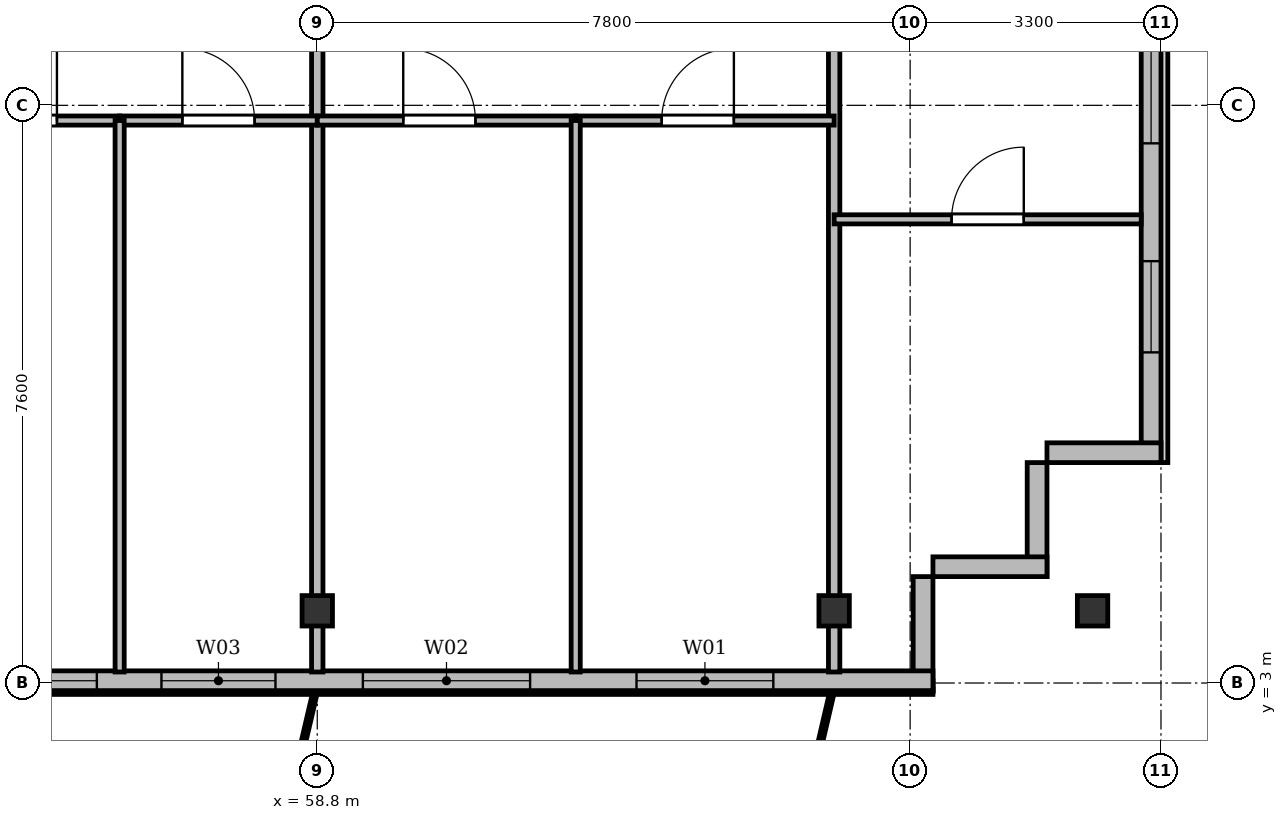
"""IFC4 building model, lengths in metres.
Left out: names, types, materials, properties, quantities, classifications, styles, units other than length and angle.
Written with IfcOpenShell. Run it as: python <this file> out.ifc"""

import sys

from ifc_helpers import new_model, si_unit, direction, frame, frame_2d, origin, origin_2d, place, context, subcontext, project, spatial, rectangle, i_section, extrude, source, transform, mapped, element, fill, save


model = new_model("IFC4")
c1 = context("Model", 3, precision=1e-05, world=origin(), true_north=direction((0.0, 1.0)))
c2 = subcontext(c1, "Body", "Model", "MODEL_VIEW")
j1 = project(units=[si_unit("LENGTHUNIT", "METRE"), si_unit("PLANEANGLEUNIT", "RADIAN")], contexts=[c1])
p1 = place(None, origin())
s1 = spatial("IfcSite", under=j1, at=p1, CompositionType="ELEMENT")
p2 = place(p1, origin())
s2 = spatial("IfcBuilding", under=s1, at=p2, CompositionType="ELEMENT")
p3 = place(p2, frame((0.0, 0.0, 96.1)))
s3 = spatial("IfcBuildingStorey", under=s2, at=p3, CompositionType="ELEMENT", Elevation=96.1)
m1 = source(origin(), c2, "Body", "SweptSolid", [
    extrude(i_section(OverallWidth=0.4, OverallDepth=0.4, WebThickness=0.022, FlangeThickness=0.035, at=origin_2d()), origin(), (0.0, 0.0, 1.0), 3.6),
])
for number, where, z_axis, x_axis in (
    (1, (58.8, 3.95, 0.0), (0.0, 0.0, 1.0), (1.0, 0.0, 0.0)),
    (2, (65.6, 3.95, 0.0), (0.0, 0.0, 1.0), (1.0, 0.0, 0.0)),
    (3, (69.0, 3.95, 0.0), (0.0, 0.0, 1.0), (1.0, 0.0, 0.0)),
):
    element("IfcColumn", number, at=place(p3, frame(where, z_axis=z_axis, x_axis=x_axis)), inside=s3, PredefinedType="COLUMN", context=c2, shape_type="MappedRepresentation", body=[
        mapped(m1, transform((0.0, 0.0, 0.0), x_axis=(1.0, 0.0, 0.0), y_axis=(0.0, 1.0, 0.0), z_axis=(0.0, 0.0, 1.0), scale=1.0)),
    ])
p4 = place(p3, frame((69.77, 45.5, 0.0), z_axis=(0.0, 0.0, 1.0), x_axis=(0.0, -1.0, 0.0)))
e4 = element("IfcWall", 4, at=p4, inside=s3, PredefinedType="SOLIDWALL", context=c2, shape_type="SweptSolid", body=[
    extrude(rectangle(XDim=39.6, YDim=0.26, at=frame_2d((19.8, 0.0))), origin(), (0.0, 0.0, 1.0), 3.34),
])
p5 = place(p4, frame((36.95, 0.0, 0.92)))
e5 = element("IfcOpeningElement", 5, at=p5, cuts=e4, PredefinedType="OPENING", context=c2, shape_type="SweptSolid", body=[
    extrude(rectangle(XDim=1.2, YDim=1.65, at=frame_2d((0.6, 0.825))), frame((0.0, 0.14, 0.0), z_axis=(0.0, -1.0, 0.0), x_axis=(1.0, 0.0, 0.0)), (0.0, 0.0, 1.0), 0.28),
])
p6 = place(p4, frame((32.8, 0.0, 0.92)))
e6 = element("IfcOpeningElement", 6, at=p6, cuts=e4, PredefinedType="OPENING", context=c2, shape_type="SweptSolid", body=[
    extrude(rectangle(XDim=2.6, YDim=1.9, at=frame_2d((1.3, 0.95))), frame((0.0, 0.14, 0.0), z_axis=(0.0, -1.0, 0.0), x_axis=(1.0, 0.0, 0.0)), (0.0, 0.0, 1.0), 0.28),
])
p7 = place(p4, frame((28.6, 0.0, 0.92)))
e7 = element("IfcOpeningElement", 7, at=p7, cuts=e4, PredefinedType="OPENING", context=c2, shape_type="SweptSolid", body=[
    extrude(rectangle(XDim=2.6, YDim=1.9, at=frame_2d((1.3, 0.95))), frame((0.0, 0.14, 0.0), z_axis=(0.0, -1.0, 0.0), x_axis=(1.0, 0.0, 0.0)), (0.0, 0.0, 1.0), 0.28),
])
p8 = place(p4, frame((21.4, 0.0, 0.92)))
e8 = element("IfcOpeningElement", 8, at=p8, cuts=e4, PredefinedType="OPENING", context=c2, shape_type="SweptSolid", body=[
    extrude(rectangle(XDim=2.6, YDim=1.9, at=frame_2d((1.3, 0.95))), frame((0.0, 0.14, 0.0), z_axis=(0.0, -1.0, 0.0), x_axis=(1.0, 0.0, 0.0)), (0.0, 0.0, 1.0), 0.28),
])
p9 = place(p4, frame((7.4, 0.0, 0.92)))
e9 = element("IfcOpeningElement", 9, at=p9, cuts=e4, PredefinedType="OPENING", context=c2, shape_type="SweptSolid", body=[
    extrude(rectangle(XDim=2.6, YDim=1.9, at=frame_2d((1.3, 0.95))), frame((0.0, 0.14, 0.0), z_axis=(0.0, -1.0, 0.0), x_axis=(1.0, 0.0, 0.0)), (0.0, 0.0, 1.0), 0.28),
])
p10 = place(p4, frame((4.5, 0.0, 0.92)))
e10 = element("IfcOpeningElement", 10, at=p10, cuts=e4, PredefinedType="OPENING", context=c2, shape_type="SweptSolid", body=[
    extrude(rectangle(XDim=1.2, YDim=1.65, at=frame_2d((0.6, 0.825))), frame((0.0, 0.14, 0.0), z_axis=(0.0, -1.0, 0.0), x_axis=(1.0, 0.0, 0.0)), (0.0, 0.0, 1.0), 0.28),
])
p11 = place(p4, frame((1.15, 0.0, 0.92)))
e11 = element("IfcOpeningElement", 11, at=p11, cuts=e4, PredefinedType="OPENING", context=c2, shape_type="SweptSolid", body=[
    extrude(rectangle(XDim=1.2, YDim=1.65, at=frame_2d((0.6, 0.825))), frame((0.0, 0.14, 0.0), z_axis=(0.0, -1.0, 0.0), x_axis=(1.0, 0.0, 0.0)), (0.0, 0.0, 1.0), 0.28),
])
p12 = place(p3, frame((69.9, 6.03, 0.0), z_axis=(0.0, 0.0, 1.0), x_axis=(-1.0, 0.0, 0.0)))
e12 = element("IfcWall", 12, at=p12, inside=s3, PredefinedType="SOLIDWALL", context=c2, shape_type="SweptSolid", body=[
    extrude(rectangle(XDim=1.5, YDim=0.26, at=frame_2d((0.75, 0.0))), origin(), (0.0, 0.0, 1.0), 2.84),
])
for number, where, z_axis, x_axis in (
    (13, (68.27, 5.9, 0.0), (0.0, 0.0, 1.0), (0.0, -1.0, 0.0)),
    (14, (68.4, 4.53, 0.0), (0.0, 0.0, 1.0), (-1.0, 0.0, 0.0)),
):
    element("IfcWall", number, at=place(p3, frame(where, z_axis=z_axis, x_axis=x_axis)), inside=s3, PredefinedType="SOLIDWALL", context=c2, shape_type="SweptSolid", body=[
        extrude(rectangle(XDim=1.5, YDim=0.26, at=frame_2d((0.75, 0.0))), origin(), (0.0, 0.0, 1.0), 3.34),
    ])
p13 = place(p3, frame((66.77, 4.4, 0.0), z_axis=(0.0, 0.0, 1.0), x_axis=(0.0, -1.0, 0.0)))
e15 = element("IfcWall", 15, at=p13, inside=s3, PredefinedType="SOLIDWALL", context=c2, shape_type="SweptSolid", body=[
    extrude(rectangle(XDim=1.5, YDim=0.26, at=frame_2d((0.75, 0.0))), origin(), (0.0, 0.0, 1.0), 2.752),
])
p14 = place(p3, frame((66.9, 3.03, 0.0), z_axis=(0.0, 0.0, 1.0), x_axis=(-1.0, 0.0, 0.0)))
e16 = element("IfcWall", 16, at=p14, inside=s3, PredefinedType="SOLIDWALL", context=c2, shape_type="SweptSolid", body=[
    extrude(rectangle(XDim=59.4, YDim=0.26, at=frame_2d((29.7, 0.0))), origin(), (0.0, 0.0, 1.0), 3.34),
])
p15 = place(p14, frame((2.1, 0.0, 0.9)))
e17 = element("IfcOpeningElement", 17, at=p15, cuts=e16, PredefinedType="OPENING", context=c2, shape_type="SweptSolid", body=[
    extrude(rectangle(XDim=1.8, YDim=1.8, at=frame_2d((0.9, 0.9))), frame((0.0, 0.14, 0.0), z_axis=(0.0, -1.0, 0.0), x_axis=(1.0, 0.0, 0.0)), (0.0, 0.0, 1.0), 0.28),
])
p16 = place(p14, frame((5.3, 0.0, 0.9)))
e18 = element("IfcOpeningElement", 18, at=p16, cuts=e16, PredefinedType="OPENING", context=c2, shape_type="SweptSolid", body=[
    extrude(rectangle(XDim=2.2, YDim=1.8, at=frame_2d((1.1, 0.9))), frame((0.0, 0.14, 0.0), z_axis=(0.0, -1.0, 0.0), x_axis=(1.0, 0.0, 0.0)), (0.0, 0.0, 1.0), 0.28),
])
p17 = place(p14, frame((8.65, 0.0, 0.9)))
e19 = element("IfcOpeningElement", 19, at=p17, cuts=e16, PredefinedType="OPENING", context=c2, shape_type="SweptSolid", body=[
    extrude(rectangle(XDim=1.5, YDim=1.75, at=frame_2d((0.75, 0.875))), frame((0.0, 0.14, 0.0), z_axis=(0.0, -1.0, 0.0), x_axis=(1.0, 0.0, 0.0)), (0.0, 0.0, 1.0), 0.28),
])
p18 = place(p14, frame((11.0, 0.0, 0.9)))
e20 = element("IfcOpeningElement", 20, at=p18, cuts=e16, PredefinedType="OPENING", context=c2, shape_type="SweptSolid", body=[
    extrude(rectangle(XDim=2.0, YDim=1.95, at=frame_2d((1.0, 0.975))), frame((0.0, 0.14, 0.0), z_axis=(0.0, -1.0, 0.0), x_axis=(1.0, 0.0, 0.0)), (0.0, 0.0, 1.0), 0.28),
])
p19 = place(p14, frame((13.775, 0.0, 0.9)))
e21 = element("IfcOpeningElement", 21, at=p19, cuts=e16, PredefinedType="OPENING", context=c2, shape_type="SweptSolid", body=[
    extrude(rectangle(XDim=1.65, YDim=1.85, at=frame_2d((0.825, 0.925))), frame((0.0, 0.14, 0.0), z_axis=(0.0, -1.0, 0.0), x_axis=(1.0, 0.0, 0.0)), (0.0, 0.0, 1.0), 0.28),
])
p20 = place(p14, frame((16.7, 0.0, 0.9)))
e22 = element("IfcOpeningElement", 22, at=p20, cuts=e16, PredefinedType="OPENING", context=c2, shape_type="SweptSolid", body=[
    extrude(rectangle(XDim=1.8, YDim=1.8, at=frame_2d((0.9, 0.9))), frame((0.0, 0.14, 0.0), z_axis=(0.0, -1.0, 0.0), x_axis=(1.0, 0.0, 0.0)), (0.0, 0.0, 1.0), 0.28),
])
p21 = place(p14, frame((20.227, 0.0, 0.0)))
e23 = element("IfcOpeningElement", 23, at=p21, cuts=e16, PredefinedType="OPENING", context=c2, shape_type="SweptSolid", body=[
    extrude(rectangle(XDim=1.2, YDim=2.2, at=frame_2d((0.6, 1.1))), frame((0.0, 0.14, 0.0), z_axis=(0.0, -1.0, 0.0), x_axis=(1.0, 0.0, 0.0)), (0.0, 0.0, 1.0), 0.28),
])
p22 = place(p14, frame((28.95, 0.0, 0.9)))
e24 = element("IfcOpeningElement", 24, at=p22, cuts=e16, PredefinedType="OPENING", context=c2, shape_type="SweptSolid", body=[
    extrude(rectangle(XDim=1.5, YDim=1.75, at=frame_2d((0.75, 0.875))), frame((0.0, 0.14, 0.0), z_axis=(0.0, -1.0, 0.0), x_axis=(1.0, 0.0, 0.0)), (0.0, 0.0, 1.0), 0.28),
])
p23 = place(p14, frame((36.5, 0.0, 0.9)))
e25 = element("IfcOpeningElement", 25, at=p23, cuts=e16, PredefinedType="OPENING", context=c2, shape_type="SweptSolid", body=[
    extrude(rectangle(XDim=2.0, YDim=1.95, at=frame_2d((1.0, 0.975))), frame((0.0, 0.14, 0.0), z_axis=(0.0, -1.0, 0.0), x_axis=(1.0, 0.0, 0.0)), (0.0, 0.0, 1.0), 0.28),
])
p24 = place(p14, frame((39.075, 0.0, 0.9)))
e26 = element("IfcOpeningElement", 26, at=p24, cuts=e16, PredefinedType="OPENING", context=c2, shape_type="SweptSolid", body=[
    extrude(rectangle(XDim=1.65, YDim=1.85, at=frame_2d((0.825, 0.925))), frame((0.0, 0.14, 0.0), z_axis=(0.0, -1.0, 0.0), x_axis=(1.0, 0.0, 0.0)), (0.0, 0.0, 1.0), 0.28),
])
p25 = place(p14, frame((41.4, 0.0, 0.9)))
e27 = element("IfcOpeningElement", 27, at=p25, cuts=e16, PredefinedType="OPENING", context=c2, shape_type="SweptSolid", body=[
    extrude(rectangle(XDim=1.8, YDim=1.8, at=frame_2d((0.9, 0.9))), frame((0.0, 0.14, 0.0), z_axis=(0.0, -1.0, 0.0), x_axis=(1.0, 0.0, 0.0)), (0.0, 0.0, 1.0), 0.28),
])
p26 = place(p14, frame((45.36, 0.0, 0.0)))
e28 = element("IfcOpeningElement", 28, at=p26, cuts=e16, PredefinedType="OPENING", context=c2, shape_type="SweptSolid", body=[
    extrude(rectangle(XDim=1.2, YDim=2.2, at=frame_2d((0.6, 1.1))), frame((0.0, 0.14, 0.0), z_axis=(0.0, -1.0, 0.0), x_axis=(1.0, 0.0, 0.0)), (0.0, 0.0, 1.0), 0.28),
])
p27 = place(p14, frame((48.55, 0.0, 0.9)))
e29 = element("IfcOpeningElement", 29, at=p27, cuts=e16, PredefinedType="OPENING", context=c2, shape_type="SweptSolid", body=[
    extrude(rectangle(XDim=1.5, YDim=1.75, at=frame_2d((0.75, 0.875))), frame((0.0, 0.14, 0.0), z_axis=(0.0, -1.0, 0.0), x_axis=(1.0, 0.0, 0.0)), (0.0, 0.0, 1.0), 0.28),
])
p28 = place(p14, frame((52.0, 0.0, 0.9)))
e30 = element("IfcOpeningElement", 30, at=p28, cuts=e16, PredefinedType="OPENING", context=c2, shape_type="SweptSolid", body=[
    extrude(rectangle(XDim=2.0, YDim=1.95, at=frame_2d((1.0, 0.975))), frame((0.0, 0.14, 0.0), z_axis=(0.0, -1.0, 0.0), x_axis=(1.0, 0.0, 0.0)), (0.0, 0.0, 1.0), 0.28),
])
p29 = place(p14, frame((55.575, 0.0, 0.9)))
e31 = element("IfcOpeningElement", 31, at=p29, cuts=e16, PredefinedType="OPENING", context=c2, shape_type="SweptSolid", body=[
    extrude(rectangle(XDim=1.65, YDim=1.85, at=frame_2d((0.825, 0.925))), frame((0.0, 0.14, 0.0), z_axis=(0.0, -1.0, 0.0), x_axis=(1.0, 0.0, 0.0)), (0.0, 0.0, 1.0), 0.28),
])
for number, where, z_axis, x_axis in (
    (32, (58.8, 3.145, 0.0), (0.0, 0.0, 1.0), (0.0, 1.0, 0.0)),
    (33, (65.6, 3.145, 0.0), (0.0, 0.0, 1.0), (0.0, 1.0, 0.0)),
):
    element("IfcWall", number, at=place(p3, frame(where, z_axis=z_axis, x_axis=x_axis)), inside=s3, PredefinedType="PARTITIONING", context=c2, shape_type="SweptSolid", body=[
        extrude(rectangle(XDim=24.455, YDim=0.15, at=frame_2d((12.228, 0.0))), origin(), (0.0, 0.0, 1.0), 2.84),
    ])
p30 = place(p3, frame((53.6, 10.4, 0.0), z_axis=(0.0, 0.0, 1.0), x_axis=(1.0, 0.0, 0.0)))
e34 = element("IfcWall", 34, at=p30, inside=s3, PredefinedType="PARTITIONING", context=c2, shape_type="SweptSolid", body=[
    extrude(rectangle(XDim=2.6, YDim=0.12, at=frame_2d((1.3, 0.0))), origin(), (0.0, 0.0, 1.0), 3.34),
])
p31 = place(p30, frame((0.825, 0.0, 0.0)))
e35 = element("IfcOpeningElement", 35, at=p31, cuts=e34, PredefinedType="OPENING", context=c2, shape_type="SweptSolid", body=[
    extrude(rectangle(XDim=0.95, YDim=2.15, at=frame_2d((0.475, 1.075))), frame((0.0, 0.07, 0.0), z_axis=(0.0, -1.0, 0.0), x_axis=(1.0, 0.0, 0.0)), (0.0, 0.0, 1.0), 0.14),
])
p32 = place(p3, frame((56.2, 10.4, 0.0), z_axis=(0.0, 0.0, 1.0), x_axis=(1.0, 0.0, 0.0)))
e36 = element("IfcWall", 36, at=p32, inside=s3, PredefinedType="PARTITIONING", context=c2, shape_type="SweptSolid", body=[
    extrude(rectangle(XDim=2.6, YDim=0.12, at=frame_2d((1.3, 0.0))), origin(), (0.0, 0.0, 1.0), 2.84),
])
p33 = place(p32, frame((0.825, 0.0, 0.0)))
e37 = element("IfcOpeningElement", 37, at=p33, cuts=e36, PredefinedType="OPENING", context=c2, shape_type="SweptSolid", body=[
    extrude(rectangle(XDim=0.95, YDim=2.15, at=frame_2d((0.475, 1.075))), frame((0.0, 0.07, 0.0), z_axis=(0.0, -1.0, 0.0), x_axis=(1.0, 0.0, 0.0)), (0.0, 0.0, 1.0), 0.14),
])
p34 = place(p3, frame((56.2, 3.145, 0.0), z_axis=(0.0, 0.0, 1.0), x_axis=(0.0, 1.0, 0.0)))
e38 = element("IfcWall", 38, at=p34, inside=s3, PredefinedType="PARTITIONING", context=c2, shape_type="SweptSolid", body=[
    extrude(rectangle(XDim=7.255, YDim=0.12, at=frame_2d((3.627, 0.0))), origin(), (0.0, 0.0, 1.0), 2.752),
])
p35 = place(p3, frame((58.8, 10.4, 0.0), z_axis=(0.0, 0.0, 1.0), x_axis=(1.0, 0.0, 0.0)))
e39 = element("IfcWall", 39, at=p35, inside=s3, PredefinedType="PARTITIONING", context=c2, shape_type="SweptSolid", body=[
    extrude(rectangle(XDim=3.4, YDim=0.12, at=frame_2d((1.7, 0.0))), origin(), (0.0, 0.0, 1.0), 2.84),
])
p36 = place(p35, frame((1.131, 0.0, 0.0)))
e40 = element("IfcOpeningElement", 40, at=p36, cuts=e39, PredefinedType="OPENING", context=c2, shape_type="SweptSolid", body=[
    extrude(rectangle(XDim=0.95, YDim=2.15, at=frame_2d((0.475, 1.075))), frame((0.0, 0.07, 0.0), z_axis=(0.0, -1.0, 0.0), x_axis=(1.0, 0.0, 0.0)), (0.0, 0.0, 1.0), 0.14),
])
p37 = place(p3, frame((62.2, 10.4, 0.0), z_axis=(0.0, 0.0, 1.0), x_axis=(1.0, 0.0, 0.0)))
e41 = element("IfcWall", 41, at=p37, inside=s3, PredefinedType="PARTITIONING", context=c2, shape_type="SweptSolid", body=[
    extrude(rectangle(XDim=3.4, YDim=0.12, at=frame_2d((1.7, 0.0))), origin(), (0.0, 0.0, 1.0), 2.84),
])
p38 = place(p37, frame((1.131, 0.0, 0.0)))
e42 = element("IfcOpeningElement", 42, at=p38, cuts=e41, PredefinedType="OPENING", context=c2, shape_type="SweptSolid", body=[
    extrude(rectangle(XDim=0.95, YDim=2.15, at=frame_2d((0.475, 1.075))), frame((0.0, 0.07, 0.0), z_axis=(0.0, -1.0, 0.0), x_axis=(1.0, 0.0, 0.0)), (0.0, 0.0, 1.0), 0.14),
])
p39 = place(p3, frame((62.2, 3.145, 0.0), z_axis=(0.0, 0.0, 1.0), x_axis=(0.0, 1.0, 0.0)))
e43 = element("IfcWall", 43, at=p39, inside=s3, PredefinedType="PARTITIONING", context=c2, shape_type="SweptSolid", body=[
    extrude(rectangle(XDim=7.255, YDim=0.12, at=frame_2d((3.627, 0.0))), origin(), (0.0, 0.0, 1.0), 2.752),
])
p40 = place(p3, frame((65.6, 9.1, 0.0), z_axis=(0.0, 0.0, 1.0), x_axis=(1.0, 0.0, 0.0)))
e44 = element("IfcWall", 44, at=p40, inside=s3, PredefinedType="PARTITIONING", context=c2, shape_type="SweptSolid", body=[
    extrude(rectangle(XDim=4.04, YDim=0.12, at=frame_2d((2.02, 0.0))), origin(), (0.0, 0.0, 1.0), 2.84),
])
p41 = place(p40, frame((1.545, 0.0, 0.0)))
e45 = element("IfcOpeningElement", 45, at=p41, cuts=e44, PredefinedType="OPENING", context=c2, shape_type="SweptSolid", body=[
    extrude(rectangle(XDim=0.95, YDim=2.15, at=frame_2d((0.475, 1.075))), frame((0.0, 0.07, 0.0), z_axis=(0.0, -1.0, 0.0), x_axis=(1.0, 0.0, 0.0)), (0.0, 0.0, 1.0), 0.14),
])
m2 = source(origin(), c2, "Body", "SweptSolid", [
    extrude(rectangle(XDim=1.2, YDim=1.65, at=frame_2d((0.6, 0.825))), frame((0.0, 0.03, 0.0), z_axis=(0.0, -1.0, 0.0), x_axis=(1.0, 0.0, 0.0)), (0.0, 0.0, 1.0), 0.06),
])
p42 = place(p5, origin())
e46 = element("IfcWindow", 46, at=p42, inside=s3, PartitioningType="SINGLE_PANEL", PredefinedType="WINDOW", context=c2, shape_type="MappedRepresentation", body=[
    mapped(m2, transform((0.0, 0.0, 0.0), x_axis=(1.0, 0.0, 0.0), y_axis=(0.0, 1.0, 0.0), z_axis=(0.0, 0.0, 1.0), scale=1.0)),
])
fill(e5, e46)
m3 = source(origin(), c2, "Body", "SweptSolid", [
    extrude(rectangle(XDim=2.6, YDim=1.9, at=frame_2d((1.3, 0.95))), frame((0.0, 0.03, 0.0), z_axis=(0.0, -1.0, 0.0), x_axis=(1.0, 0.0, 0.0)), (0.0, 0.0, 1.0), 0.06),
])
p43 = place(p6, origin())
e47 = element("IfcWindow", 47, at=p43, inside=s3, PartitioningType="SINGLE_PANEL", PredefinedType="WINDOW", context=c2, shape_type="MappedRepresentation", body=[
    mapped(m3, transform((0.0, 0.0, 0.0), x_axis=(1.0, 0.0, 0.0), y_axis=(0.0, 1.0, 0.0), z_axis=(0.0, 0.0, 1.0), scale=1.0)),
])
fill(e6, e47)
m4 = source(origin(), c2, "Body", "SweptSolid", [
    extrude(rectangle(XDim=1.8, YDim=1.8, at=frame_2d((0.9, 0.9))), frame((0.0, 0.03, 0.0), z_axis=(0.0, -1.0, 0.0), x_axis=(1.0, 0.0, 0.0)), (0.0, 0.0, 1.0), 0.06),
])
p44 = place(p15, origin())
e48 = element("IfcWindow", 48, at=p44, inside=s3, PartitioningType="SINGLE_PANEL", PredefinedType="WINDOW", context=c2, shape_type="MappedRepresentation", body=[
    mapped(m4, transform((0.0, 0.0, 0.0), x_axis=(1.0, 0.0, 0.0), y_axis=(0.0, 1.0, 0.0), z_axis=(0.0, 0.0, 1.0), scale=1.0)),
])
fill(e17, e48)
m5 = source(origin(), c2, "Body", "SweptSolid", [
    extrude(rectangle(XDim=2.2, YDim=1.8, at=frame_2d((1.1, 0.9))), frame((0.0, 0.03, 0.0), z_axis=(0.0, -1.0, 0.0), x_axis=(1.0, 0.0, 0.0)), (0.0, 0.0, 1.0), 0.06),
])
p45 = place(p16, origin())
e49 = element("IfcWindow", 49, at=p45, inside=s3, PartitioningType="SINGLE_PANEL", PredefinedType="WINDOW", context=c2, shape_type="MappedRepresentation", body=[
    mapped(m5, transform((0.0, 0.0, 0.0), x_axis=(1.0, 0.0, 0.0), y_axis=(0.0, 1.0, 0.0), z_axis=(0.0, 0.0, 1.0), scale=1.0)),
])
fill(e18, e49)
m6 = source(origin(), c2, "Body", "SweptSolid", [
    extrude(rectangle(XDim=1.5, YDim=1.75, at=frame_2d((0.75, 0.875))), frame((0.0, 0.03, 0.0), z_axis=(0.0, -1.0, 0.0), x_axis=(1.0, 0.0, 0.0)), (0.0, 0.0, 1.0), 0.06),
])
p46 = place(p17, origin())
e50 = element("IfcWindow", 50, at=p46, inside=s3, PartitioningType="SINGLE_PANEL", PredefinedType="WINDOW", context=c2, shape_type="MappedRepresentation", body=[
    mapped(m6, transform((0.0, 0.0, 0.0), x_axis=(1.0, 0.0, 0.0), y_axis=(0.0, 1.0, 0.0), z_axis=(0.0, 0.0, 1.0), scale=1.0)),
])
fill(e19, e50)
m7 = source(origin(), c2, "Body", "SweptSolid", [
    extrude(rectangle(XDim=2.0, YDim=1.95, at=frame_2d((1.0, 0.975))), frame((0.0, 0.03, 0.0), z_axis=(0.0, -1.0, 0.0), x_axis=(1.0, 0.0, 0.0)), (0.0, 0.0, 1.0), 0.06),
])
p47 = place(p18, origin())
e51 = element("IfcWindow", 51, at=p47, inside=s3, PartitioningType="SINGLE_PANEL", PredefinedType="WINDOW", context=c2, shape_type="MappedRepresentation", body=[
    mapped(m7, transform((0.0, 0.0, 0.0), x_axis=(1.0, 0.0, 0.0), y_axis=(0.0, 1.0, 0.0), z_axis=(0.0, 0.0, 1.0), scale=1.0)),
])
fill(e20, e51)
m8 = source(origin(), c2, "Body", "SweptSolid", [
    extrude(rectangle(XDim=0.95, YDim=2.15, at=frame_2d((0.475, 1.075))), frame((0.0, 0.025, 0.0), z_axis=(0.0, -1.0, 0.0), x_axis=(1.0, 0.0, 0.0)), (0.0, 0.0, 1.0), 0.05),
])
p48 = place(p31, origin())
e52 = element("IfcDoor", 52, at=p48, inside=s3, OperationType="SINGLE_SWING_RIGHT", PredefinedType="DOOR", context=c2, shape_type="MappedRepresentation", body=[
    mapped(m8, transform((0.0, 0.0, 0.0), x_axis=(1.0, 0.0, 0.0), y_axis=(0.0, 1.0, 0.0), z_axis=(0.0, 0.0, 1.0), scale=1.0)),
])
fill(e35, e52)
p49 = place(p33, origin())
e53 = element("IfcDoor", 53, at=p49, inside=s3, OperationType="SINGLE_SWING_LEFT", PredefinedType="DOOR", context=c2, shape_type="MappedRepresentation", body=[
    mapped(m8, transform((0.0, 0.0, 0.0), x_axis=(1.0, 0.0, 0.0), y_axis=(0.0, 1.0, 0.0), z_axis=(0.0, 0.0, 1.0), scale=1.0)),
])
fill(e37, e53)
p50 = place(p36, origin())
e54 = element("IfcDoor", 54, at=p50, inside=s3, OperationType="SINGLE_SWING_LEFT", PredefinedType="DOOR", context=c2, shape_type="MappedRepresentation", body=[
    mapped(m8, transform((0.0, 0.0, 0.0), x_axis=(1.0, 0.0, 0.0), y_axis=(0.0, 1.0, 0.0), z_axis=(0.0, 0.0, 1.0), scale=1.0)),
])
fill(e40, e54)
p51 = place(p38, origin())
e55 = element("IfcDoor", 55, at=p51, inside=s3, OperationType="SINGLE_SWING_RIGHT", PredefinedType="DOOR", context=c2, shape_type="MappedRepresentation", body=[
    mapped(m8, transform((0.0, 0.0, 0.0), x_axis=(1.0, 0.0, 0.0), y_axis=(0.0, 1.0, 0.0), z_axis=(0.0, 0.0, 1.0), scale=1.0)),
])
fill(e42, e55)
p52 = place(p41, origin())
e56 = element("IfcDoor", 56, at=p52, inside=s3, OperationType="SINGLE_SWING_RIGHT", PredefinedType="DOOR", context=c2, shape_type="MappedRepresentation", body=[
    mapped(m8, transform((0.0, 0.0, 0.0), x_axis=(1.0, 0.0, 0.0), y_axis=(0.0, 1.0, 0.0), z_axis=(0.0, 0.0, 1.0), scale=1.0)),
])
fill(e45, e56)
save(model, sys.argv[1])
